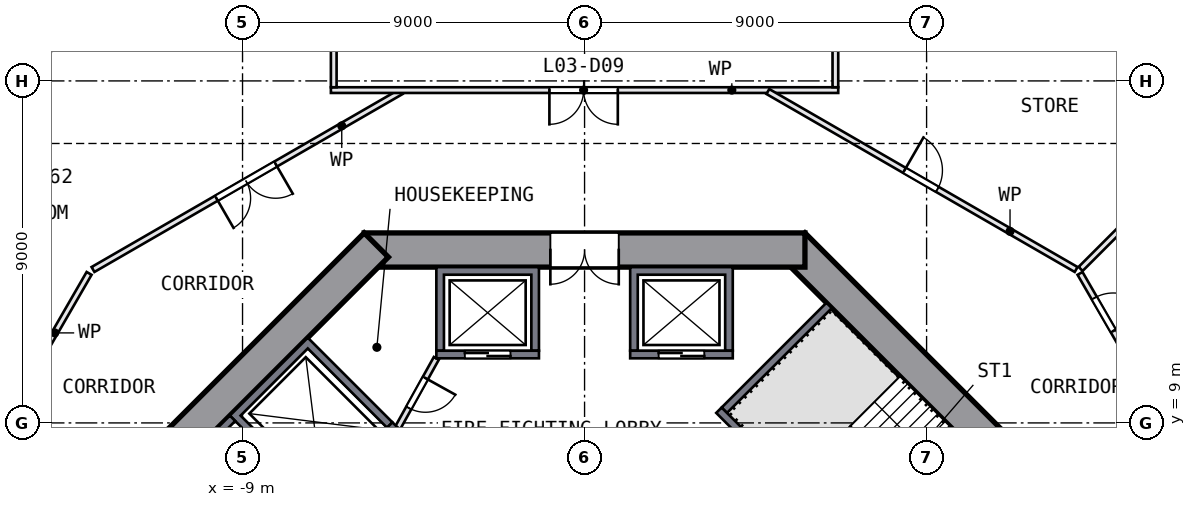
"""IFC4 building model, lengths in metres.
Left out: names, types, materials, properties, quantities, classifications, styles, units other than length and angle.
Written with IfcOpenShell. Run it as: python <this file> out.ifc"""

import sys

from ifc_helpers import new_model, si_unit, direction, frame, frame_2d, origin, place, context, subcontext, project, spatial, polyline, rectangle, outline, extrude, element, fill, save


model = new_model("IFC4")
c1 = context("Model", 3, precision=1e-05, world=origin(), true_north=direction((0.0, 1.0)))
c2 = subcontext(c1, "Body", "Model", "MODEL_VIEW")
j1 = project(units=[si_unit("LENGTHUNIT", "METRE"), si_unit("PLANEANGLEUNIT", "RADIAN")], contexts=[c1])
p1 = place(None, origin())
s1 = spatial("IfcSite", under=j1, at=p1, CompositionType="ELEMENT")
p2 = place(p1, origin())
s2 = spatial("IfcBuilding", under=s1, at=p2, CompositionType="ELEMENT")
p3 = place(p2, frame((0.0, 0.0, 19.0)))
s3 = spatial("IfcBuildingStorey", under=s2, at=p3, CompositionType="ELEMENT", Elevation=19.0)
p4 = place(p3, frame((13.682, 5.481, 0.0), z_axis=(0.0, 0.0, 1.0), x_axis=(-0.707106781, 0.707106781, 0.0)))
e1 = element("IfcWall", 1, at=p4, inside=s3, PredefinedType="SHEAR", context=c2, shape_type="SweptSolid", body=[
    extrude(rectangle(XDim=11.598, YDim=0.9, at=frame_2d((5.799, 0.0))), origin(), (0.0, 0.0, 1.0), 4.5),
])
p5 = place(p4, frame((2.099, 0.0, 0.0)))
e2 = element("IfcOpeningElement", 2, at=p5, cuts=e1, PredefinedType="OPENING", context=c2, shape_type="SweptSolid", body=[
    extrude(rectangle(XDim=1.2, YDim=2.1, at=frame_2d((0.6, 1.05))), frame((0.0, 0.46, 0.0), z_axis=(0.0, -1.0, 0.0), x_axis=(1.0, 0.0, 0.0)), (0.0, 0.0, 1.0), 0.92),
])
p6 = place(p3, frame((5.799, 13.55, 0.0), z_axis=(0.0, 0.0, 1.0), x_axis=(-1.0, 0.0, 0.0)))
e3 = element("IfcWall", 3, at=p6, inside=s3, PredefinedType="SHEAR", context=c2, shape_type="SweptSolid", body=[
    extrude(rectangle(XDim=11.598, YDim=0.9, at=frame_2d((5.799, 0.0))), origin(), (0.0, 0.0, 1.0), 4.5),
])
p7 = place(p6, frame((4.899, 0.0, 0.0)))
e4 = element("IfcOpeningElement", 4, at=p7, cuts=e3, PredefinedType="OPENING", context=c2, shape_type="SweptSolid", body=[
    extrude(rectangle(XDim=1.8, YDim=2.1, at=frame_2d((0.9, 1.05))), frame((0.0, 0.46, 0.0), z_axis=(0.0, -1.0, 0.0), x_axis=(1.0, 0.0, 0.0)), (0.0, 0.0, 1.0), 0.92),
])
p8 = place(p3, frame((-5.481, 13.682, 0.0), z_axis=(0.0, 0.0, 1.0), x_axis=(-0.707106781, -0.707106781, 0.0)))
e5 = element("IfcWall", 5, at=p8, inside=s3, PredefinedType="SHEAR", context=c2, shape_type="SweptSolid", body=[
    extrude(rectangle(XDim=11.598, YDim=0.9, at=frame_2d((5.799, 0.0))), origin(), (0.0, 0.0, 1.0), 4.5),
])
p9 = place(p3, frame((-6.36, 24.258, 0.0), z_axis=(0.0, 0.0, 1.0), x_axis=(-0.866029009, -0.499993756, 0.0)))
e6 = element("IfcWall", 6, at=p9, inside=s3, PredefinedType="SOLIDWALL", context=c2, shape_type="SweptSolid", body=[
    extrude(rectangle(XDim=13.242, YDim=0.14, at=frame_2d((6.621, 0.0))), origin(), (0.0, 0.0, 1.0), 4.05),
])
p10 = place(p9, frame((1.46, 0.0, 0.9)))
e7 = element("IfcOpeningElement", 7, at=p10, cuts=e6, PredefinedType="OPENING", context=c2, shape_type="SweptSolid", body=[
    extrude(rectangle(XDim=3.6, YDim=2.4, at=frame_2d((1.8, 1.2))), frame((0.0, 0.08, 0.0), z_axis=(0.0, -1.0, 0.0), x_axis=(1.0, 0.0, 0.0)), (0.0, 0.0, 1.0), 0.16),
])
p11 = place(p9, frame((8.215, 0.0, 0.9)))
e8 = element("IfcOpeningElement", 8, at=p11, cuts=e6, PredefinedType="OPENING", context=c2, shape_type="SweptSolid", body=[
    extrude(rectangle(XDim=3.0, YDim=2.4, at=frame_2d((1.5, 1.2))), frame((0.0, 0.08, 0.0), z_axis=(0.0, -1.0, 0.0), x_axis=(1.0, 0.0, 0.0)), (0.0, 0.0, 1.0), 0.16),
])
p12 = place(p3, frame((17.586, 17.777, 0.0), z_axis=(0.0, 0.0, 1.0), x_axis=(-0.866023287, 0.500003667, 0.0)))
e9 = element("IfcWall", 9, at=p12, inside=s3, PredefinedType="SOLIDWALL", context=c2, shape_type="SweptSolid", body=[
    extrude(rectangle(XDim=12.801, YDim=0.14, at=frame_2d((6.4, 0.0))), origin(), (0.0, 0.0, 1.0), 4.05),
])
p13 = place(p3, origin())
e10 = element("IfcWall", 10, at=p13, inside=s3, PredefinedType="SOLIDWALL", context=c2, shape_type="SweptSolid", body=[
    extrude(outline(polyline([(3.9, 13.1), (3.9, 10.9), (3.7, 10.9), (3.7, 12.9), (1.4, 12.9), (1.4, 10.9), (1.2, 10.9), (1.2, 13.1), (3.9, 13.1)])), origin(), (0.0, 0.0, 1.0), 4.05),
])
p14 = place(p3, frame((1.2, 10.8, 0.0), z_axis=(0.0, 0.0, 1.0), x_axis=(1.0, 0.0, 0.0)))
e11 = element("IfcWall", 11, at=p14, inside=s3, PredefinedType="SOLIDWALL", context=c2, shape_type="SweptSolid", body=[
    extrude(rectangle(XDim=2.7, YDim=0.2, at=frame_2d((1.35, 0.0))), origin(), (0.0, 0.0, 1.0), 4.05),
])
p15 = place(p14, frame((0.75, 0.0, 0.0)))
e12 = element("IfcOpeningElement", 12, at=p15, cuts=e11, PredefinedType="OPENING", context=c2, shape_type="SweptSolid", body=[
    extrude(rectangle(XDim=1.2, YDim=2.1, at=frame_2d((0.6, 1.05))), frame((0.0, 0.11, 0.0), z_axis=(0.0, -1.0, 0.0), x_axis=(1.0, 0.0, 0.0)), (0.0, 0.0, 1.0), 0.22),
])
p16 = place(p3, origin())
e13 = element("IfcWall", 13, at=p16, inside=s3, PredefinedType="SOLIDWALL", context=c2, shape_type="SweptSolid", body=[
    extrude(outline(polyline([(-3.9, 10.9), (-3.9, 13.1), (-1.2, 13.1), (-1.2, 10.9), (-1.4, 10.9), (-1.4, 12.9), (-3.7, 12.9), (-3.7, 10.9), (-3.9, 10.9)])), origin(), (0.0, 0.0, 1.0), 4.05),
])
p17 = place(p3, frame((-1.2, 10.8, 0.0), z_axis=(0.0, 0.0, 1.0), x_axis=(-1.0, 0.0, 0.0)))
e14 = element("IfcWall", 14, at=p17, inside=s3, PredefinedType="SOLIDWALL", context=c2, shape_type="SweptSolid", body=[
    extrude(rectangle(XDim=2.7, YDim=0.2, at=frame_2d((1.35, 0.0))), origin(), (0.0, 0.0, 1.0), 4.05),
])
p18 = place(p17, frame((0.75, 0.0, 0.0)))
e15 = element("IfcOpeningElement", 15, at=p18, cuts=e14, PredefinedType="OPENING", context=c2, shape_type="SweptSolid", body=[
    extrude(rectangle(XDim=1.2, YDim=2.1, at=frame_2d((0.6, 1.05))), frame((0.0, 0.11, 0.0), z_axis=(0.0, -1.0, 0.0), x_axis=(1.0, 0.0, 0.0)), (0.0, 0.0, 1.0), 0.22),
])
p19 = place(p3, origin())
e16 = element("IfcWall", 16, at=p19, inside=s3, PredefinedType="SOLIDWALL", context=c2, shape_type="SweptSolid", body=[
    extrude(outline(polyline([(-9.334, 9.192), (-7.283, 11.243), (-5.056, 9.016), (-5.197, 8.874), (-7.283, 10.96), (-9.051, 9.192), (-6.965, 7.106), (-7.106, 6.965), (-9.334, 9.192)])), origin(), (0.0, 0.0, 1.0), 4.05),
])
p20 = place(p3, frame((-4.985, 8.945, 0.0), z_axis=(0.0, 0.0, 1.0), x_axis=(-0.707106781, -0.707106781, 0.0)))
e17 = element("IfcWall", 17, at=p20, inside=s3, PredefinedType="SOLIDWALL", context=c2, shape_type="SweptSolid", body=[
    extrude(rectangle(XDim=2.9, YDim=0.2, at=frame_2d((1.45, 0.0))), origin(), (0.0, 0.0, 1.0), 4.05),
])
p21 = place(p20, frame((0.85, 0.0, 0.0)))
e18 = element("IfcOpeningElement", 18, at=p21, cuts=e17, PredefinedType="OPENING", context=c2, shape_type="SweptSolid", body=[
    extrude(rectangle(XDim=1.2, YDim=2.1, at=frame_2d((0.6, 1.05))), frame((0.0, 0.11, 0.0), z_axis=(0.0, -1.0, 0.0), x_axis=(1.0, 0.0, 0.0)), (0.0, 0.0, 1.0), 0.22),
])
p22 = place(p3, origin())
e19 = element("IfcWall", 19, at=p22, inside=s3, PredefinedType="SOLIDWALL", context=c2, shape_type="SweptSolid", body=[
    extrude(outline(polyline([(-11.243, 7.283), (-9.334, 9.192), (-9.192, 9.051), (-10.96, 7.283), (-8.874, 5.197), (-9.016, 5.056), (-11.243, 7.283)])), origin(), (0.0, 0.0, 1.0), 4.05),
])
p23 = place(p3, frame((3.535, 9.334, 0.0), z_axis=(0.0, 0.0, 1.0), x_axis=(0.707106781, -0.707106781, 0.0)))
e20 = element("IfcWall", 20, at=p23, inside=s3, PredefinedType="SOLIDWALL", context=c2, shape_type="SweptSolid", body=[
    extrude(rectangle(XDim=8.2, YDim=0.2, at=frame_2d((4.1, 0.0))), origin(), (0.0, 0.0, 1.0), 4.05),
])
p24 = place(p23, frame((6.6, 0.0, 0.0)))
e21 = element("IfcOpeningElement", 21, at=p24, cuts=e20, PredefinedType="OPENING", context=c2, shape_type="SweptSolid", body=[
    extrude(rectangle(XDim=1.2, YDim=2.1, at=frame_2d((0.6, 1.05))), frame((0.0, 0.11, 0.0), z_axis=(0.0, -1.0, 0.0), x_axis=(1.0, 0.0, 0.0)), (0.0, 0.0, 1.0), 0.22),
])
p25 = place(p3, frame((3.677, 9.334, 0.0), z_axis=(0.0, 0.0, 1.0), x_axis=(0.707106781, 0.707106781, 0.0)))
e22 = element("IfcWall", 22, at=p25, inside=s3, PredefinedType="SOLIDWALL", context=c2, shape_type="SweptSolid", body=[
    extrude(rectangle(XDim=3.9, YDim=0.2, at=frame_2d((1.95, 0.0))), origin(), (0.0, 0.0, 1.0), 4.05),
])
p26 = place(p3, frame((-3.9, 10.7, 0.0), z_axis=(0.0, 0.0, 1.0), x_axis=(-0.485692555, -0.874129705, 0.0)))
e23 = element("IfcWall", 23, at=p26, inside=s3, PredefinedType="PARTITIONING", context=c2, shape_type="SweptSolid", body=[
    extrude(rectangle(XDim=2.089, YDim=0.15, at=frame_2d((1.044, 0.0))), origin(), (0.0, 0.0, 1.0), 4.05),
])
p27 = place(p26, frame((0.594, 0.0, 0.0)))
e24 = element("IfcOpeningElement", 24, at=p27, cuts=e23, PredefinedType="OPENING", context=c2, shape_type="SweptSolid", body=[
    extrude(rectangle(XDim=0.9, YDim=2.1, at=frame_2d((0.45, 1.05))), frame((0.0, 0.085, 0.0), z_axis=(0.0, -1.0, 0.0), x_axis=(1.0, 0.0, 0.0)), (0.0, 0.0, 1.0), 0.17),
])
p28 = place(p3, frame((-13.038, 12.935, 0.0), z_axis=(0.0, 0.0, 1.0), x_axis=(-0.499979668, -0.866037142, 0.0)))
e25 = element("IfcWall", 25, at=p28, inside=s3, PredefinedType="PARTITIONING", context=c2, shape_type="SweptSolid", body=[
    extrude(rectangle(XDim=9.367, YDim=0.15, at=frame_2d((4.683, 0.0))), origin(), (0.0, 0.0, 1.0), 4.05),
])
p29 = place(p28, frame((3.817, 0.0, 0.0)))
e26 = element("IfcOpeningElement", 26, at=p29, cuts=e25, PredefinedType="OPENING", context=c2, shape_type="SweptSolid", body=[
    extrude(rectangle(XDim=1.8, YDim=2.1, at=frame_2d((0.9, 1.05))), frame((0.0, 0.085, 0.0), z_axis=(0.0, -1.0, 0.0), x_axis=(1.0, 0.0, 0.0)), (0.0, 0.0, 1.0), 0.17),
])
p30 = place(p3, frame((-4.823, 17.721, 0.0), z_axis=(0.0, 0.0, 1.0), x_axis=(-0.866037142, -0.499979668, 0.0)))
e27 = element("IfcWall", 27, at=p30, inside=s3, PredefinedType="PARTITIONING", context=c2, shape_type="SweptSolid", body=[
    extrude(rectangle(XDim=9.367, YDim=0.15, at=frame_2d((4.683, 0.0))), origin(), (0.0, 0.0, 1.0), 4.05),
])
p31 = place(p30, frame((3.817, 0.0, 0.0)))
e28 = element("IfcOpeningElement", 28, at=p31, cuts=e27, PredefinedType="OPENING", context=c2, shape_type="SweptSolid", body=[
    extrude(rectangle(XDim=1.8, YDim=2.1, at=frame_2d((0.9, 1.05))), frame((0.0, 0.085, 0.0), z_axis=(0.0, -1.0, 0.0), x_axis=(1.0, 0.0, 0.0)), (0.0, 0.0, 1.0), 0.17),
])
p32 = place(p3, frame((6.675, 17.758, 0.0), z_axis=(0.0, 0.0, 1.0), x_axis=(-1.0, 0.0, 0.0)))
e29 = element("IfcWall", 29, at=p32, inside=s3, PredefinedType="PARTITIONING", context=c2, shape_type="SweptSolid", body=[
    extrude(rectangle(XDim=13.35, YDim=0.15, at=frame_2d((6.675, 0.0))), origin(), (0.0, 0.0, 1.0), 4.05),
])
p33 = place(p32, frame((5.8, 0.0, 0.0)))
e30 = element("IfcOpeningElement", 30, at=p33, cuts=e29, PredefinedType="OPENING", context=c2, shape_type="SweptSolid", body=[
    extrude(rectangle(XDim=1.8, YDim=2.1, at=frame_2d((0.9, 1.05))), frame((0.0, 0.085, 0.0), z_axis=(0.0, -1.0, 0.0), x_axis=(1.0, 0.0, 0.0)), (0.0, 0.0, 1.0), 0.17),
])
p34 = place(p3, frame((-6.6, 23.415, 0.0), z_axis=(0.0, 0.0, 1.0), x_axis=(0.0, -1.0, 0.0)))
e31 = element("IfcWall", 31, at=p34, inside=s3, PredefinedType="PARTITIONING", context=c2, shape_type="SweptSolid", body=[
    extrude(rectangle(XDim=5.582, YDim=0.15, at=frame_2d((2.791, 0.0))), origin(), (0.0, 0.0, 1.0), 4.05),
])
p35 = place(p3, frame((4.823, 17.721, 0.0), z_axis=(0.0, 0.0, 1.0), x_axis=(0.866037142, -0.499979668, 0.0)))
e32 = element("IfcWall", 32, at=p35, inside=s3, PredefinedType="PARTITIONING", context=c2, shape_type="SweptSolid", body=[
    extrude(rectangle(XDim=9.367, YDim=0.15, at=frame_2d((4.683, 0.0))), origin(), (0.0, 0.0, 1.0), 4.05),
])
p36 = place(p35, frame((4.15, 0.0, 0.0)))
e33 = element("IfcOpeningElement", 33, at=p36, cuts=e32, PredefinedType="OPENING", context=c2, shape_type="SweptSolid", body=[
    extrude(rectangle(XDim=1.0, YDim=2.1, at=frame_2d((0.5, 1.05))), frame((0.0, 0.085, 0.0), z_axis=(0.0, -1.0, 0.0), x_axis=(1.0, 0.0, 0.0)), (0.0, 0.0, 1.0), 0.17),
])
p37 = place(p3, frame((6.6, 17.833, 0.0), z_axis=(0.0, 0.0, 1.0), x_axis=(0.0, 1.0, 0.0)))
e34 = element("IfcWall", 34, at=p37, inside=s3, PredefinedType="PARTITIONING", context=c2, shape_type="SweptSolid", body=[
    extrude(rectangle(XDim=5.582, YDim=0.15, at=frame_2d((2.791, 0.0))), origin(), (0.0, 0.0, 1.0), 4.05),
])
p38 = place(p3, frame((13.038, 12.935, 0.0), z_axis=(0.0, 0.0, 1.0), x_axis=(0.499933044, -0.866064057, 0.0)))
e35 = element("IfcWall", 35, at=p38, inside=s3, PredefinedType="PARTITIONING", context=c2, shape_type="SweptSolid", body=[
    extrude(rectangle(XDim=2.408, YDim=0.15, at=frame_2d((1.204, 0.0))), origin(), (0.0, 0.0, 1.0), 4.05),
])
p39 = place(p38, frame((0.75, 0.0, 0.0)))
e36 = element("IfcOpeningElement", 36, at=p39, cuts=e35, PredefinedType="OPENING", context=c2, shape_type="SweptSolid", body=[
    extrude(rectangle(XDim=1.0, YDim=2.1, at=frame_2d((0.5, 1.05))), frame((0.0, 0.085, 0.0), z_axis=(0.0, -1.0, 0.0), x_axis=(1.0, 0.0, 0.0)), (0.0, 0.0, 1.0), 0.17),
])
p40 = place(p3, frame((17.7, 17.7, 0.0), z_axis=(0.0, 0.0, 1.0), x_axis=(-0.707106781, -0.707106781, 0.0)))
e37 = element("IfcWall", 37, at=p40, inside=s3, PredefinedType="PARTITIONING", context=c2, shape_type="SweptSolid", body=[
    extrude(rectangle(XDim=6.572, YDim=0.15, at=frame_2d((3.286, 0.0))), origin(), (0.0, 0.0, 1.0), 4.05),
])
p41 = place(p11, origin())
e38 = element("IfcWindow", 38, at=p41, inside=s3, PartitioningType="SINGLE_PANEL", PredefinedType="WINDOW", context=c2, shape_type="SweptSolid", body=[
    extrude(rectangle(XDim=3.0, YDim=2.4, at=frame_2d((1.5, 1.2))), frame((0.0, 0.03, 0.0), z_axis=(0.0, -1.0, 0.0), x_axis=(1.0, 0.0, 0.0)), (0.0, 0.0, 1.0), 0.06),
])
fill(e8, e38)
p42 = place(p15, origin())
e39 = element("IfcDoor", 39, at=p42, inside=s3, OperationType="DOUBLE_DOOR_SLIDING", PredefinedType="DOOR", context=c2, shape_type="SweptSolid", body=[
    extrude(rectangle(XDim=1.2, YDim=2.1, at=frame_2d((0.6, 1.05))), frame((0.0, 0.025, 0.0), z_axis=(0.0, -1.0, 0.0), x_axis=(1.0, 0.0, 0.0)), (0.0, 0.0, 1.0), 0.05),
])
fill(e12, e39)
p43 = place(p18, origin())
e40 = element("IfcDoor", 40, at=p43, inside=s3, OperationType="DOUBLE_DOOR_SLIDING", PredefinedType="DOOR", context=c2, shape_type="SweptSolid", body=[
    extrude(rectangle(XDim=1.2, YDim=2.1, at=frame_2d((0.6, 1.05))), frame((0.0, 0.025, 0.0), z_axis=(0.0, -1.0, 0.0), x_axis=(1.0, 0.0, 0.0)), (0.0, 0.0, 1.0), 0.05),
])
fill(e15, e40)
p44 = place(p7, origin())
e41 = element("IfcDoor", 41, at=p44, inside=s3, OperationType="DOUBLE_DOOR_SINGLE_SWING", PredefinedType="DOOR", context=c2, shape_type="SweptSolid", body=[
    extrude(rectangle(XDim=1.8, YDim=2.1, at=frame_2d((0.9, 1.05))), frame((0.0, 0.025, 0.0), z_axis=(0.0, -1.0, 0.0), x_axis=(1.0, 0.0, 0.0)), (0.0, 0.0, 1.0), 0.05),
])
fill(e4, e41)
p45 = place(p27, origin())
e42 = element("IfcDoor", 42, at=p45, inside=s3, OperationType="SINGLE_SWING_LEFT", PredefinedType="DOOR", context=c2, shape_type="SweptSolid", body=[
    extrude(rectangle(XDim=0.9, YDim=2.1, at=frame_2d((0.45, 1.05))), frame((0.0, 0.025, 0.0), z_axis=(0.0, -1.0, 0.0), x_axis=(1.0, 0.0, 0.0)), (0.0, 0.0, 1.0), 0.05),
])
fill(e24, e42)
p46 = place(p31, origin())
e43 = element("IfcDoor", 43, at=p46, inside=s3, OperationType="DOUBLE_DOOR_SINGLE_SWING", PredefinedType="DOOR", context=c2, shape_type="SweptSolid", body=[
    extrude(rectangle(XDim=1.8, YDim=2.1, at=frame_2d((0.9, 1.05))), frame((0.0, 0.025, 0.0), z_axis=(0.0, -1.0, 0.0), x_axis=(1.0, 0.0, 0.0)), (0.0, 0.0, 1.0), 0.05),
])
fill(e28, e43)
p47 = place(p33, origin())
e44 = element("IfcDoor", 44, at=p47, inside=s3, OperationType="DOUBLE_DOOR_SINGLE_SWING", PredefinedType="DOOR", context=c2, shape_type="SweptSolid", body=[
    extrude(rectangle(XDim=1.8, YDim=2.1, at=frame_2d((0.9, 1.05))), frame((0.0, 0.025, 0.0), z_axis=(0.0, -1.0, 0.0), x_axis=(1.0, 0.0, 0.0)), (0.0, 0.0, 1.0), 0.05),
])
fill(e30, e44)
p48 = place(p36, origin())
e45 = element("IfcDoor", 45, at=p48, inside=s3, OperationType="SINGLE_SWING_LEFT", PredefinedType="DOOR", context=c2, shape_type="SweptSolid", body=[
    extrude(rectangle(XDim=1.0, YDim=2.1, at=frame_2d((0.5, 1.05))), frame((0.0, 0.025, 0.0), z_axis=(0.0, -1.0, 0.0), x_axis=(1.0, 0.0, 0.0)), (0.0, 0.0, 1.0), 0.05),
])
fill(e33, e45)
p49 = place(p39, origin())
e46 = element("IfcDoor", 46, at=p49, inside=s3, OperationType="SINGLE_SWING_RIGHT", PredefinedType="DOOR", context=c2, shape_type="SweptSolid", body=[
    extrude(rectangle(XDim=1.0, YDim=2.1, at=frame_2d((0.5, 1.05))), frame((0.0, 0.025, 0.0), z_axis=(0.0, -1.0, 0.0), x_axis=(1.0, 0.0, 0.0)), (0.0, 0.0, 1.0), 0.05),
])
fill(e36, e46)
save(model, sys.argv[1])
